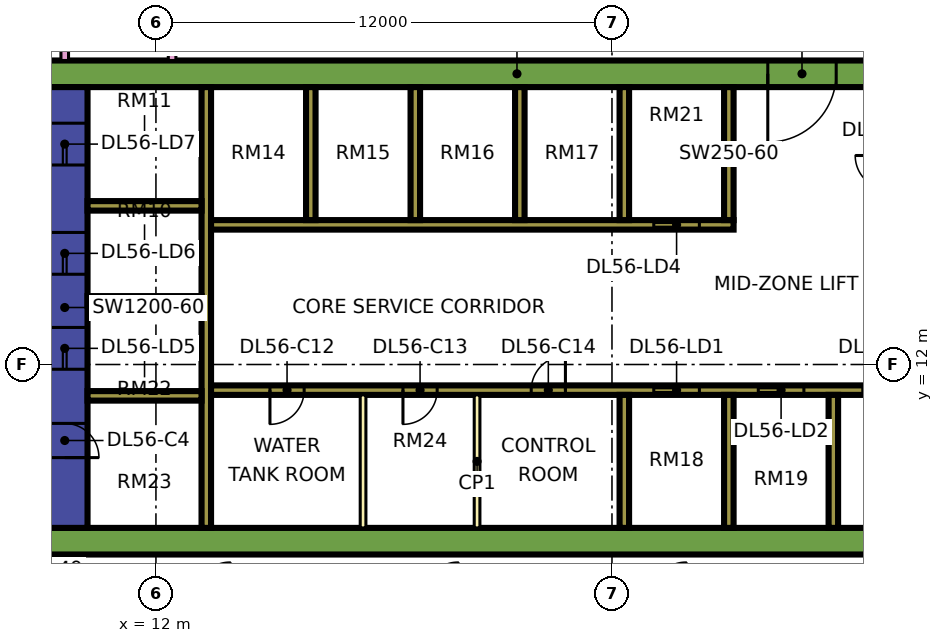
"""IFC4 building model, lengths in metres.
Left out: names, types, materials, properties, quantities, classifications, styles, units other than length and angle.
Written with IfcOpenShell. Run it as: python <this file> out.ifc"""

import sys

from ifc_helpers import new_model, si_unit, direction, frame, frame_2d, origin, place, context, subcontext, project, spatial, rectangle, extrude, element, fill, save


model = new_model("IFC4")
c1 = context("Model", 3, precision=1e-05, world=origin(), true_north=direction((0.0, 1.0)))
c2 = subcontext(c1, "Body", "Model", "MODEL_VIEW")
j1 = project(units=[si_unit("LENGTHUNIT", "METRE"), si_unit("PLANEANGLEUNIT", "RADIAN")], contexts=[c1])
p1 = place(None, origin())
s1 = spatial("IfcSite", under=j1, at=p1, CompositionType="ELEMENT")
p2 = place(p1, origin())
s2 = spatial("IfcBuilding", under=s1, at=p2, CompositionType="ELEMENT")
p3 = place(p2, frame((0.0, 0.0, 237.9)))
s3 = spatial("IfcBuildingStorey", under=s2, at=p3, CompositionType="ELEMENT", Elevation=237.9)
p4 = place(p3, frame((9.0, 7.35, 0.0), z_axis=(0.0, 0.0, 1.0), x_axis=(1.0, 0.0, 0.0)))
e1 = element("IfcWall", 1, at=p4, inside=s3, PredefinedType="SHEAR", context=c2, shape_type="SweptSolid", body=[
    extrude(rectangle(XDim=25.0, YDim=0.7, at=frame_2d((12.5, 0.0))), origin(), (0.0, 0.0, 1.0), 3.75),
])
p5 = place(p3, frame((9.0, 19.65, 0.0), z_axis=(0.0, 0.0, 1.0), x_axis=(1.0, 0.0, 0.0)))
e2 = element("IfcWall", 2, at=p5, inside=s3, PredefinedType="SHEAR", context=c2, shape_type="SweptSolid", body=[
    extrude(rectangle(XDim=25.0, YDim=0.7, at=frame_2d((12.5, 0.0))), origin(), (0.0, 0.0, 1.0), 3.75),
])
p6 = place(p5, frame((19.1, 0.0, 0.0)))
e3 = element("IfcOpeningElement", 3, at=p6, cuts=e2, PredefinedType="OPENING", context=c2, shape_type="SweptSolid", body=[
    extrude(rectangle(XDim=1.8, YDim=2.4, at=frame_2d((0.9, 1.2))), frame((0.0, 0.36, 0.0), z_axis=(0.0, -1.0, 0.0), x_axis=(1.0, 0.0, 0.0)), (0.0, 0.0, 1.0), 0.72),
])
p7 = place(p3, frame((9.6, 7.7, 0.0), z_axis=(0.0, 0.0, 1.0), x_axis=(0.0, 1.0, 0.0)))
e4 = element("IfcWall", 4, at=p7, inside=s3, PredefinedType="SHEAR", context=c2, shape_type="SweptSolid", body=[
    extrude(rectangle(XDim=11.6, YDim=1.2, at=frame_2d((5.8, 0.0))), origin(), (0.0, 0.0, 1.0), 3.75),
])
p8 = place(p7, frame((4.175, 0.0, 0.0)))
e5 = element("IfcOpeningElement", 5, at=p8, cuts=e4, PredefinedType="OPENING", context=c2, shape_type="SweptSolid", body=[
    extrude(rectangle(XDim=1.1, YDim=2.2, at=frame_2d((0.55, 1.1))), frame((0.0, 0.61, 0.0), z_axis=(0.0, -1.0, 0.0), x_axis=(1.0, 0.0, 0.0)), (0.0, 0.0, 1.0), 1.22),
])
p9 = place(p7, frame((6.675, 0.0, 0.0)))
e6 = element("IfcOpeningElement", 6, at=p9, cuts=e4, PredefinedType="OPENING", context=c2, shape_type="SweptSolid", body=[
    extrude(rectangle(XDim=1.1, YDim=2.2, at=frame_2d((0.55, 1.1))), frame((0.0, 0.61, 0.0), z_axis=(0.0, -1.0, 0.0), x_axis=(1.0, 0.0, 0.0)), (0.0, 0.0, 1.0), 1.22),
])
p10 = place(p7, frame((9.55, 0.0, 0.0)))
e7 = element("IfcOpeningElement", 7, at=p10, cuts=e4, PredefinedType="OPENING", context=c2, shape_type="SweptSolid", body=[
    extrude(rectangle(XDim=1.1, YDim=2.2, at=frame_2d((0.55, 1.1))), frame((0.0, 0.61, 0.0), z_axis=(0.0, -1.0, 0.0), x_axis=(1.0, 0.0, 0.0)), (0.0, 0.0, 1.0), 1.22),
])
p11 = place(p7, frame((1.85, 0.0, 0.0)))
e8 = element("IfcOpeningElement", 8, at=p11, cuts=e4, PredefinedType="OPENING", context=c2, shape_type="SweptSolid", body=[
    extrude(rectangle(XDim=0.9, YDim=2.1, at=frame_2d((0.45, 1.05))), frame((0.0, 0.61, 0.0), z_axis=(0.0, -1.0, 0.0), x_axis=(1.0, 0.0, 0.0)), (0.0, 0.0, 1.0), 1.22),
])
p12 = place(p3, frame((13.325, 7.7, 0.0), z_axis=(0.0, 0.0, 1.0), x_axis=(0.0, 1.0, 0.0)))
e9 = element("IfcWall", 9, at=p12, inside=s3, PredefinedType="SHEAR", context=c2, shape_type="SweptSolid", body=[
    extrude(rectangle(XDim=11.6, YDim=0.25, at=frame_2d((5.8, 0.0))), origin(), (0.0, 0.0, 1.0), 3.75),
])
p13 = place(p3, frame((13.45, 11.325, 0.0), z_axis=(0.0, 0.0, 1.0), x_axis=(1.0, 0.0, 0.0)))
e10 = element("IfcWall", 10, at=p13, inside=s3, PredefinedType="SHEAR", context=c2, shape_type="SweptSolid", body=[
    extrude(rectangle(XDim=19.85, YDim=0.25, at=frame_2d((9.925, 0.0))), origin(), (0.0, 0.0, 1.0), 3.75),
])
p14 = place(p13, frame((11.65, 0.0, 0.0)))
e11 = element("IfcOpeningElement", 11, at=p14, cuts=e10, PredefinedType="OPENING", context=c2, shape_type="SweptSolid", body=[
    extrude(rectangle(XDim=1.2, YDim=2.2, at=frame_2d((0.6, 1.1))), frame((0.0, 0.135, 0.0), z_axis=(0.0, -1.0, 0.0), x_axis=(1.0, 0.0, 0.0)), (0.0, 0.0, 1.0), 0.27),
])
p15 = place(p13, frame((14.4, 0.0, 0.0)))
e12 = element("IfcOpeningElement", 12, at=p15, cuts=e10, PredefinedType="OPENING", context=c2, shape_type="SweptSolid", body=[
    extrude(rectangle(XDim=1.2, YDim=2.2, at=frame_2d((0.6, 1.1))), frame((0.0, 0.135, 0.0), z_axis=(0.0, -1.0, 0.0), x_axis=(1.0, 0.0, 0.0)), (0.0, 0.0, 1.0), 0.27),
])
p16 = place(p13, frame((17.15, 0.0, 0.0)))
e13 = element("IfcOpeningElement", 13, at=p16, cuts=e10, PredefinedType="OPENING", context=c2, shape_type="SweptSolid", body=[
    extrude(rectangle(XDim=1.2, YDim=2.2, at=frame_2d((0.6, 1.1))), frame((0.0, 0.135, 0.0), z_axis=(0.0, -1.0, 0.0), x_axis=(1.0, 0.0, 0.0)), (0.0, 0.0, 1.0), 0.27),
])
p17 = place(p13, frame((1.55, 0.0, 0.0)))
e14 = element("IfcOpeningElement", 14, at=p17, cuts=e10, PredefinedType="OPENING", context=c2, shape_type="SweptSolid", body=[
    extrude(rectangle(XDim=0.9, YDim=2.1, at=frame_2d((0.45, 1.05))), frame((0.0, 0.135, 0.0), z_axis=(0.0, -1.0, 0.0), x_axis=(1.0, 0.0, 0.0)), (0.0, 0.0, 1.0), 0.27),
])
p18 = place(p13, frame((5.05, 0.0, 0.0)))
e15 = element("IfcOpeningElement", 15, at=p18, cuts=e10, PredefinedType="OPENING", context=c2, shape_type="SweptSolid", body=[
    extrude(rectangle(XDim=0.9, YDim=2.1, at=frame_2d((0.45, 1.05))), frame((0.0, 0.135, 0.0), z_axis=(0.0, -1.0, 0.0), x_axis=(1.0, 0.0, 0.0)), (0.0, 0.0, 1.0), 0.27),
])
p19 = place(p13, frame((8.425, 0.0, 0.0)))
e16 = element("IfcOpeningElement", 16, at=p19, cuts=e10, PredefinedType="OPENING", context=c2, shape_type="SweptSolid", body=[
    extrude(rectangle(XDim=0.9, YDim=2.1, at=frame_2d((0.45, 1.05))), frame((0.0, 0.135, 0.0), z_axis=(0.0, -1.0, 0.0), x_axis=(1.0, 0.0, 0.0)), (0.0, 0.0, 1.0), 0.27),
])
p20 = place(p3, frame((13.45, 15.675, 0.0), z_axis=(0.0, 0.0, 1.0), x_axis=(1.0, 0.0, 0.0)))
e17 = element("IfcWall", 17, at=p20, inside=s3, PredefinedType="SHEAR", context=c2, shape_type="SweptSolid", body=[
    extrude(rectangle(XDim=13.75, YDim=0.25, at=frame_2d((6.875, 0.0))), origin(), (0.0, 0.0, 1.0), 3.75),
])
p21 = place(p20, frame((11.65, 0.0, 0.0)))
e18 = element("IfcOpeningElement", 18, at=p21, cuts=e17, PredefinedType="OPENING", context=c2, shape_type="SweptSolid", body=[
    extrude(rectangle(XDim=1.2, YDim=2.2, at=frame_2d((0.6, 1.1))), frame((0.0, 0.135, 0.0), z_axis=(0.0, -1.0, 0.0), x_axis=(1.0, 0.0, 0.0)), (0.0, 0.0, 1.0), 0.27),
])
for number, where, z_axis, x_axis in (
    (19, (10.2, 11.175, 0.0), (0.0, 0.0, 1.0), (1.0, 0.0, 0.0)),
    (20, (10.2, 13.675, 0.0), (0.0, 0.0, 1.0), (1.0, 0.0, 0.0)),
    (21, (10.2, 16.175, 0.0), (0.0, 0.0, 1.0), (1.0, 0.0, 0.0)),
):
    element("IfcWall", number, at=place(p3, frame(where, z_axis=z_axis, x_axis=x_axis)), inside=s3, PredefinedType="SHEAR", context=c2, shape_type="SweptSolid", body=[
        extrude(rectangle(XDim=3.0, YDim=0.25, at=frame_2d((1.5, 0.0))), origin(), (0.0, 0.0, 1.0), 3.75),
    ])
for number, where, z_axis, x_axis in (
    (22, (24.325, 7.7, 0.0), (0.0, 0.0, 1.0), (0.0, 1.0, 0.0)),
    (23, (27.075, 7.7, 0.0), (0.0, 0.0, 1.0), (0.0, 1.0, 0.0)),
    (24, (29.825, 7.7, 0.0), (0.0, 0.0, 1.0), (0.0, 1.0, 0.0)),
    (25, (16.075, 15.8, 0.0), (0.0, 0.0, 1.0), (0.0, 1.0, 0.0)),
    (26, (18.825, 15.8, 0.0), (0.0, 0.0, 1.0), (0.0, 1.0, 0.0)),
    (27, (21.575, 15.8, 0.0), (0.0, 0.0, 1.0), (0.0, 1.0, 0.0)),
    (28, (24.325, 15.8, 0.0), (0.0, 0.0, 1.0), (0.0, 1.0, 0.0)),
    (29, (27.075, 15.8, 0.0), (0.0, 0.0, 1.0), (0.0, 1.0, 0.0)),
):
    element("IfcWall", number, at=place(p3, frame(where, z_axis=z_axis, x_axis=x_axis)), inside=s3, PredefinedType="SHEAR", context=c2, shape_type="SweptSolid", body=[
        extrude(rectangle(XDim=3.5, YDim=0.25, at=frame_2d((1.75, 0.0))), origin(), (0.0, 0.0, 1.0), 3.75),
    ])
p22 = place(p3, frame((-1.447, 12.553, 0.0), z_axis=(0.0, 0.0, 1.0), x_axis=(0.707106781187, -0.707106781187, 0.0)))
e30 = element("IfcWall", 30, at=p22, inside=s3, PredefinedType="SOLIDWALL", context=c2, shape_type="SweptSolid", body=[
    extrude(rectangle(XDim=19.799, YDim=0.15, at=frame_2d((9.899, 0.0))), origin(), (0.0, 0.0, 1.0), 3.35),
])
p23 = place(p22, frame((2.212, 0.0, 0.45)))
e31 = element("IfcOpeningElement", 31, at=p23, cuts=e30, PredefinedType="OPENING", context=c2, shape_type="SweptSolid", body=[
    extrude(rectangle(XDim=3.0, YDim=2.4, at=frame_2d((1.5, 1.2))), frame((0.0, 0.085, 0.0), z_axis=(0.0, -1.0, 0.0), x_axis=(1.0, 0.0, 0.0)), (0.0, 0.0, 1.0), 0.17),
])
p24 = place(p22, frame((10.216, 0.0, 0.45)))
e32 = element("IfcOpeningElement", 32, at=p24, cuts=e30, PredefinedType="OPENING", context=c2, shape_type="SweptSolid", body=[
    extrude(rectangle(XDim=3.0, YDim=2.4, at=frame_2d((1.5, 1.2))), frame((0.0, 0.085, 0.0), z_axis=(0.0, -1.0, 0.0), x_axis=(1.0, 0.0, 0.0)), (0.0, 0.0, 1.0), 0.17),
])
for number, where, z_axis, x_axis in (
    (33, (17.45, 7.7, 0.0), (0.0, 0.0, 1.0), (0.0, 1.0, 0.0)),
    (34, (20.45, 7.7, 0.0), (0.0, 0.0, 1.0), (0.0, 1.0, 0.0)),
):
    element("IfcWall", number, at=place(p3, frame(where, z_axis=z_axis, x_axis=x_axis)), inside=s3, PredefinedType="PARTITIONING", context=c2, shape_type="SweptSolid", body=[
        extrude(rectangle(XDim=3.5, YDim=0.15, at=frame_2d((1.75, 0.0))), origin(), (0.0, 0.0, 1.0), 3.35),
    ])
p25 = place(p3, frame((9.6, 20.0, 0.0), z_axis=(0.0, 0.0, 1.0), x_axis=(0.0, 1.0, 0.0)))
e35 = element("IfcWall", 35, at=p25, inside=s3, PredefinedType="PARTITIONING", context=c2, shape_type="SweptSolid", body=[
    extrude(rectangle(XDim=42.926, YDim=0.2, at=frame_2d((21.463, 0.0))), origin(), (0.0, 0.0, 1.0), 3.35),
])
p26 = place(p25, frame((28.95, 0.0, 0.0)))
e36 = element("IfcOpeningElement", 36, at=p26, cuts=e35, PredefinedType="OPENING", context=c2, shape_type="SweptSolid", body=[
    extrude(rectangle(XDim=1.0, YDim=2.1, at=frame_2d((0.5, 1.05))), frame((0.0, 0.11, 0.0), z_axis=(0.0, -1.0, 0.0), x_axis=(1.0, 0.0, 0.0)), (0.0, 0.0, 1.0), 0.22),
])
p27 = place(p25, frame((31.95, 0.0, 0.0)))
e37 = element("IfcOpeningElement", 37, at=p27, cuts=e35, PredefinedType="OPENING", context=c2, shape_type="SweptSolid", body=[
    extrude(rectangle(XDim=1.0, YDim=2.1, at=frame_2d((0.5, 1.05))), frame((0.0, 0.11, 0.0), z_axis=(0.0, -1.0, 0.0), x_axis=(1.0, 0.0, 0.0)), (0.0, 0.0, 1.0), 0.22),
])
p28 = place(p25, frame((0.6, 0.0, 0.0)))
e38 = element("IfcOpeningElement", 38, at=p28, cuts=e35, PredefinedType="OPENING", context=c2, shape_type="SweptSolid", body=[
    extrude(rectangle(XDim=1.2, YDim=2.1, at=frame_2d((0.6, 1.05))), frame((0.0, 0.11, 0.0), z_axis=(0.0, -1.0, 0.0), x_axis=(1.0, 0.0, 0.0)), (0.0, 0.0, 1.0), 0.22),
])
p29 = place(p25, frame((11.25, 0.0, 0.0)))
e39 = element("IfcOpeningElement", 39, at=p29, cuts=e35, PredefinedType="OPENING", context=c2, shape_type="SweptSolid", body=[
    extrude(rectangle(XDim=1.0, YDim=2.1, at=frame_2d((0.5, 1.05))), frame((0.0, 0.11, 0.0), z_axis=(0.0, -1.0, 0.0), x_axis=(1.0, 0.0, 0.0)), (0.0, 0.0, 1.0), 0.22),
])
p30 = place(p3, frame((12.425, 20.0, 0.0), z_axis=(0.0, 0.0, 1.0), x_axis=(0.0, 1.0, 0.0)))
e40 = element("IfcWall", 40, at=p30, inside=s3, PredefinedType="PARTITIONING", context=c2, shape_type="SweptSolid", body=[
    extrude(rectangle(XDim=43.0, YDim=0.2, at=frame_2d((21.5, 0.0))), origin(), (0.0, 0.0, 1.0), 3.35),
])
p31 = place(p30, frame((5.95, 0.0, 0.0)))
e41 = element("IfcOpeningElement", 41, at=p31, cuts=e40, PredefinedType="OPENING", context=c2, shape_type="SweptSolid", body=[
    extrude(rectangle(XDim=1.0, YDim=2.1, at=frame_2d((0.5, 1.05))), frame((0.0, 0.11, 0.0), z_axis=(0.0, -1.0, 0.0), x_axis=(1.0, 0.0, 0.0)), (0.0, 0.0, 1.0), 0.22),
])
p32 = place(p30, frame((12.0, 0.0, 0.0)))
e42 = element("IfcOpeningElement", 42, at=p32, cuts=e40, PredefinedType="OPENING", context=c2, shape_type="SweptSolid", body=[
    extrude(rectangle(XDim=1.0, YDim=2.1, at=frame_2d((0.5, 1.05))), frame((0.0, 0.11, 0.0), z_axis=(0.0, -1.0, 0.0), x_axis=(1.0, 0.0, 0.0)), (0.0, 0.0, 1.0), 0.22),
])
p33 = place(p30, frame((16.9, 0.0, 0.0)))
e43 = element("IfcOpeningElement", 43, at=p33, cuts=e40, PredefinedType="OPENING", context=c2, shape_type="SweptSolid", body=[
    extrude(rectangle(XDim=1.0, YDim=2.1, at=frame_2d((0.5, 1.05))), frame((0.0, 0.11, 0.0), z_axis=(0.0, -1.0, 0.0), x_axis=(1.0, 0.0, 0.0)), (0.0, 0.0, 1.0), 0.22),
])
p34 = place(p30, frame((41.05, 0.0, 0.0)))
e44 = element("IfcOpeningElement", 44, at=p34, cuts=e40, PredefinedType="OPENING", context=c2, shape_type="SweptSolid", body=[
    extrude(rectangle(XDim=1.0, YDim=2.1, at=frame_2d((0.5, 1.05))), frame((0.0, 0.11, 0.0), z_axis=(0.0, -1.0, 0.0), x_axis=(1.0, 0.0, 0.0)), (0.0, 0.0, 1.0), 0.22),
])
p35 = place(p30, frame((1.15, 0.0, 0.0)))
e45 = element("IfcOpeningElement", 45, at=p35, cuts=e40, PredefinedType="OPENING", context=c2, shape_type="SweptSolid", body=[
    extrude(rectangle(XDim=1.8, YDim=2.1, at=frame_2d((0.9, 1.05))), frame((0.0, 0.11, 0.0), z_axis=(0.0, -1.0, 0.0), x_axis=(1.0, 0.0, 0.0)), (0.0, 0.0, 1.0), 0.22),
])
p36 = place(p30, frame((28.6, 0.0, 0.0)))
e46 = element("IfcOpeningElement", 46, at=p36, cuts=e40, PredefinedType="OPENING", context=c2, shape_type="SweptSolid", body=[
    extrude(rectangle(XDim=1.8, YDim=2.1, at=frame_2d((0.9, 1.05))), frame((0.0, 0.11, 0.0), z_axis=(0.0, -1.0, 0.0), x_axis=(1.0, 0.0, 0.0)), (0.0, 0.0, 1.0), 0.22),
])
p37 = place(p14, origin())
e47 = element("IfcDoor", 47, at=p37, inside=s3, OperationType="DOUBLE_DOOR_SLIDING", PredefinedType="DOOR", context=c2, shape_type="SweptSolid", body=[
    extrude(rectangle(XDim=1.2, YDim=2.2, at=frame_2d((0.6, 1.1))), frame((0.0, 0.025, 0.0), z_axis=(0.0, -1.0, 0.0), x_axis=(1.0, 0.0, 0.0)), (0.0, 0.0, 1.0), 0.05),
])
fill(e11, e47)
p38 = place(p15, origin())
e48 = element("IfcDoor", 48, at=p38, inside=s3, OperationType="DOUBLE_DOOR_SLIDING", PredefinedType="DOOR", context=c2, shape_type="SweptSolid", body=[
    extrude(rectangle(XDim=1.2, YDim=2.2, at=frame_2d((0.6, 1.1))), frame((0.0, 0.025, 0.0), z_axis=(0.0, -1.0, 0.0), x_axis=(1.0, 0.0, 0.0)), (0.0, 0.0, 1.0), 0.05),
])
fill(e12, e48)
p39 = place(p16, origin())
e49 = element("IfcDoor", 49, at=p39, inside=s3, OperationType="DOUBLE_DOOR_SLIDING", PredefinedType="DOOR", context=c2, shape_type="SweptSolid", body=[
    extrude(rectangle(XDim=1.2, YDim=2.2, at=frame_2d((0.6, 1.1))), frame((0.0, 0.025, 0.0), z_axis=(0.0, -1.0, 0.0), x_axis=(1.0, 0.0, 0.0)), (0.0, 0.0, 1.0), 0.05),
])
fill(e13, e49)
p40 = place(p21, origin())
e50 = element("IfcDoor", 50, at=p40, inside=s3, OperationType="DOUBLE_DOOR_SLIDING", PredefinedType="DOOR", context=c2, shape_type="SweptSolid", body=[
    extrude(rectangle(XDim=1.2, YDim=2.2, at=frame_2d((0.6, 1.1))), frame((0.0, 0.025, 0.0), z_axis=(0.0, -1.0, 0.0), x_axis=(1.0, 0.0, 0.0)), (0.0, 0.0, 1.0), 0.05),
])
fill(e18, e50)
p41 = place(p8, origin())
e51 = element("IfcDoor", 51, at=p41, inside=s3, OperationType="DOUBLE_DOOR_SLIDING", PredefinedType="DOOR", context=c2, shape_type="SweptSolid", body=[
    extrude(rectangle(XDim=1.1, YDim=2.2, at=frame_2d((0.55, 1.1))), frame((0.0, 0.025, 0.0), z_axis=(0.0, -1.0, 0.0), x_axis=(1.0, 0.0, 0.0)), (0.0, 0.0, 1.0), 0.05),
])
fill(e5, e51)
p42 = place(p9, origin())
e52 = element("IfcDoor", 52, at=p42, inside=s3, OperationType="DOUBLE_DOOR_SLIDING", PredefinedType="DOOR", context=c2, shape_type="SweptSolid", body=[
    extrude(rectangle(XDim=1.1, YDim=2.2, at=frame_2d((0.55, 1.1))), frame((0.0, 0.025, 0.0), z_axis=(0.0, -1.0, 0.0), x_axis=(1.0, 0.0, 0.0)), (0.0, 0.0, 1.0), 0.05),
])
fill(e6, e52)
p43 = place(p10, origin())
e53 = element("IfcDoor", 53, at=p43, inside=s3, OperationType="DOUBLE_DOOR_SLIDING", PredefinedType="DOOR", context=c2, shape_type="SweptSolid", body=[
    extrude(rectangle(XDim=1.1, YDim=2.2, at=frame_2d((0.55, 1.1))), frame((0.0, 0.025, 0.0), z_axis=(0.0, -1.0, 0.0), x_axis=(1.0, 0.0, 0.0)), (0.0, 0.0, 1.0), 0.05),
])
fill(e7, e53)
p44 = place(p6, frame((1.8, 0.0, 0.0), z_axis=(0.0, 0.0, 1.0), x_axis=(-1.0, 0.0, 0.0)))
e54 = element("IfcDoor", 54, at=p44, inside=s3, OperationType="DOUBLE_DOOR_SINGLE_SWING", PredefinedType="DOOR", context=c2, shape_type="SweptSolid", body=[
    extrude(rectangle(XDim=1.8, YDim=2.4, at=frame_2d((0.9, 1.2))), frame((0.0, 0.025, 0.0), z_axis=(0.0, -1.0, 0.0), x_axis=(1.0, 0.0, 0.0)), (0.0, 0.0, 1.0), 0.05),
])
fill(e3, e54)
p45 = place(p11, frame((0.9, 0.0, 0.0), z_axis=(0.0, 0.0, 1.0), x_axis=(-1.0, 0.0, 0.0)))
e55 = element("IfcDoor", 55, at=p45, inside=s3, OperationType="SINGLE_SWING_LEFT", PredefinedType="DOOR", context=c2, shape_type="SweptSolid", body=[
    extrude(rectangle(XDim=0.9, YDim=2.1, at=frame_2d((0.45, 1.05))), frame((0.0, 0.025, 0.0), z_axis=(0.0, -1.0, 0.0), x_axis=(1.0, 0.0, 0.0)), (0.0, 0.0, 1.0), 0.05),
])
fill(e8, e55)
p46 = place(p17, frame((0.9, 0.0, 0.0), z_axis=(0.0, 0.0, 1.0), x_axis=(-1.0, 0.0, 0.0)))
e56 = element("IfcDoor", 56, at=p46, inside=s3, OperationType="SINGLE_SWING_LEFT", PredefinedType="DOOR", context=c2, shape_type="SweptSolid", body=[
    extrude(rectangle(XDim=0.9, YDim=2.1, at=frame_2d((0.45, 1.05))), frame((0.0, 0.025, 0.0), z_axis=(0.0, -1.0, 0.0), x_axis=(1.0, 0.0, 0.0)), (0.0, 0.0, 1.0), 0.05),
])
fill(e14, e56)
p47 = place(p18, frame((0.9, 0.0, 0.0), z_axis=(0.0, 0.0, 1.0), x_axis=(-1.0, 0.0, 0.0)))
e57 = element("IfcDoor", 57, at=p47, inside=s3, OperationType="SINGLE_SWING_LEFT", PredefinedType="DOOR", context=c2, shape_type="SweptSolid", body=[
    extrude(rectangle(XDim=0.9, YDim=2.1, at=frame_2d((0.45, 1.05))), frame((0.0, 0.025, 0.0), z_axis=(0.0, -1.0, 0.0), x_axis=(1.0, 0.0, 0.0)), (0.0, 0.0, 1.0), 0.05),
])
fill(e15, e57)
p48 = place(p19, frame((0.9, 0.0, 0.0), z_axis=(0.0, 0.0, 1.0), x_axis=(-1.0, 0.0, 0.0)))
e58 = element("IfcDoor", 58, at=p48, inside=s3, OperationType="SINGLE_SWING_RIGHT", PredefinedType="DOOR", context=c2, shape_type="SweptSolid", body=[
    extrude(rectangle(XDim=0.9, YDim=2.1, at=frame_2d((0.45, 1.05))), frame((0.0, 0.025, 0.0), z_axis=(0.0, -1.0, 0.0), x_axis=(1.0, 0.0, 0.0)), (0.0, 0.0, 1.0), 0.05),
])
fill(e16, e58)
save(model, sys.argv[1])
